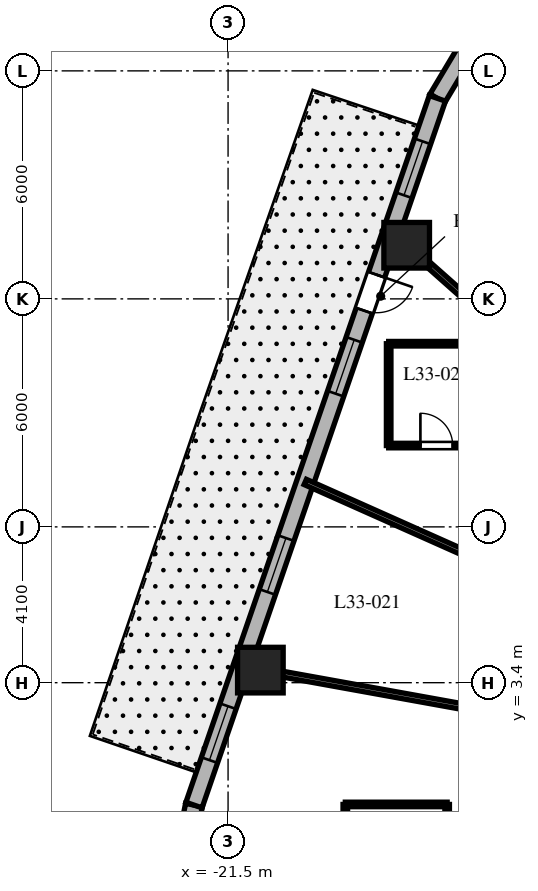
"""IFC4 building model, lengths in metres.
Left out: names, types, materials, properties, quantities, classifications, styles, units other than length and angle.
Written with IfcOpenShell. Run it as: python <this file> out.ifc"""

import sys

from ifc_helpers import new_model, si_unit, direction, frame, frame_2d, origin, origin_2d, place, context, subcontext, project, spatial, rectangle, extrude, element, fill, save


model = new_model("IFC4")
c1 = context("Model", 3, precision=1e-05, world=origin(), true_north=direction((0.0, 1.0)))
c2 = subcontext(c1, "Body", "Model", "MODEL_VIEW")
j1 = project(units=[si_unit("LENGTHUNIT", "METRE"), si_unit("PLANEANGLEUNIT", "RADIAN")], contexts=[c1])
p1 = place(None, origin())
s1 = spatial("IfcSite", under=j1, at=p1, CompositionType="ELEMENT")
p2 = place(p1, origin())
s2 = spatial("IfcBuilding", under=s1, at=p2, CompositionType="ELEMENT")
p3 = place(p2, frame((0.0, 0.0, 135.8)))
s3 = spatial("IfcBuildingStorey", under=s2, at=p3, CompositionType="ELEMENT", Elevation=135.8)
for number, where, z_axis, x_axis in (
    (1, (-16.8, 14.911, 0.0), (0.0, 0.0, 1.0), (1.0, 0.0, 0.0)),
    (2, (-20.65, 3.731, 0.0), (0.0, 0.0, 1.0), (1.0, 0.0, 0.0)),
):
    element("IfcColumn", number, at=place(p3, frame(where, z_axis=z_axis, x_axis=x_axis)), inside=s3, PredefinedType="COLUMN", context=c2, shape_type="SweptSolid", body=[
        extrude(rectangle(XDim=1.2, YDim=1.2, at=origin_2d()), origin(), (0.0, 0.0, 1.0), 3.7),
    ])
p4 = place(p3, frame((-15.272, 19.984, 0.0), z_axis=(0.0, 0.0, 1.0), x_axis=(-0.512579347361, -0.858639862025, 0.0)))
e3 = element("IfcWall", 3, at=p4, inside=s3, PredefinedType="SOLIDWALL", context=c2, shape_type="SweptSolid", body=[
    extrude(rectangle(XDim=1.406, YDim=0.45, at=frame_2d((0.703, 0.0))), origin(), (0.0, 0.0, 1.0), 3.38),
])
p5 = place(p3, frame((-22.397, 0.179, 0.0), z_axis=(0.0, 0.0, 1.0), x_axis=(-0.199313589404, -0.979935759669, 0.0)))
e4 = element("IfcWall", 4, at=p5, inside=s3, PredefinedType="SOLIDWALL", context=c2, shape_type="SweptSolid", body=[
    extrude(rectangle(XDim=0.896, YDim=0.45, at=frame_2d((0.448, 0.0))), origin(), (0.0, 0.0, 1.0), 3.38),
])
p6 = place(p3, frame((-15.992, 18.777, 0.0), z_axis=(0.0, 0.0, 1.0), x_axis=(-0.325606988926, -0.945505202927, 0.0)))
e5 = element("IfcWall", 5, at=p6, inside=s3, PredefinedType="SOLIDWALL", context=c2, shape_type="SweptSolid", body=[
    extrude(rectangle(XDim=19.669, YDim=0.45, at=frame_2d((9.835, 0.0))), origin(), (0.0, 0.0, 1.0), 3.38),
])
p7 = place(p6, frame((4.909, 0.0, 0.0)))
e6 = element("IfcOpeningElement", 6, at=p7, cuts=e5, PredefinedType="OPENING", context=c2, shape_type="SweptSolid", body=[
    extrude(rectangle(XDim=1.0, YDim=2.15, at=frame_2d((0.5, 1.075))), frame((0.0, 0.235, 0.0), z_axis=(0.0, -1.0, 0.0), x_axis=(1.0, 0.0, 0.0)), (0.0, 0.0, 1.0), 0.47),
])
p8 = place(p6, frame((1.197, 0.0, 0.8)))
e7 = element("IfcOpeningElement", 7, at=p8, cuts=e5, PredefinedType="OPENING", context=c2, shape_type="SweptSolid", body=[
    extrude(rectangle(XDim=1.5, YDim=1.8, at=frame_2d((0.75, 0.9))), frame((0.0, 0.235, 0.0), z_axis=(0.0, -1.0, 0.0), x_axis=(1.0, 0.0, 0.0)), (0.0, 0.0, 1.0), 0.47),
])
p9 = place(p6, frame((6.72, 0.0, 0.8)))
e8 = element("IfcOpeningElement", 8, at=p9, cuts=e5, PredefinedType="OPENING", context=c2, shape_type="SweptSolid", body=[
    extrude(rectangle(XDim=1.5, YDim=1.8, at=frame_2d((0.75, 0.9))), frame((0.0, 0.235, 0.0), z_axis=(0.0, -1.0, 0.0), x_axis=(1.0, 0.0, 0.0)), (0.0, 0.0, 1.0), 0.47),
])
p10 = place(p6, frame((12.238, 0.0, 0.8)))
e9 = element("IfcOpeningElement", 9, at=p10, cuts=e5, PredefinedType="OPENING", context=c2, shape_type="SweptSolid", body=[
    extrude(rectangle(XDim=1.5, YDim=1.8, at=frame_2d((0.75, 0.9))), frame((0.0, 0.235, 0.0), z_axis=(0.0, -1.0, 0.0), x_axis=(1.0, 0.0, 0.0)), (0.0, 0.0, 1.0), 0.47),
])
p11 = place(p6, frame((16.918, 0.0, 0.8)))
e10 = element("IfcOpeningElement", 10, at=p11, cuts=e5, PredefinedType="OPENING", context=c2, shape_type="SweptSolid", body=[
    extrude(rectangle(XDim=1.5, YDim=1.8, at=frame_2d((0.75, 0.9))), frame((0.0, 0.235, 0.0), z_axis=(0.0, -1.0, 0.0), x_axis=(1.0, 0.0, 0.0)), (0.0, 0.0, 1.0), 0.47),
])
p12 = place(p3, frame((-11.098, 9.85, 0.0), z_axis=(0.0, 0.0, 1.0), x_axis=(-0.747904295103, 0.663806572253, 0.0)))
e11 = element("IfcWall", 11, at=p12, inside=s3, PredefinedType="PARTITIONING", context=c2, shape_type="SweptSolid", body=[
    extrude(rectangle(XDim=8.16, YDim=0.15, at=frame_2d((4.08, 0.0))), origin(), (0.0, 0.0, 1.0), 2.52),
])
p13 = place(p3, frame((-11.35, 5.062, 0.0), z_axis=(0.0, 0.0, 1.0), x_axis=(-0.91329663997, 0.407295037312, 0.0)))
e12 = element("IfcWall", 12, at=p13, inside=s3, PredefinedType="PARTITIONING", context=c2, shape_type="SweptSolid", body=[
    extrude(rectangle(XDim=8.889, YDim=0.15, at=frame_2d((4.445, 0.0))), origin(), (0.0, 0.0, 1.0), 2.52),
])
p14 = place(p3, frame((-11.35, 2.051, 0.0), z_axis=(0.0, 0.0, 1.0), x_axis=(-0.984068313063, 0.177790762484, 0.0)))
e13 = element("IfcWall", 13, at=p14, inside=s3, PredefinedType="PARTITIONING", context=c2, shape_type="SweptSolid", body=[
    extrude(rectangle(XDim=9.951, YDim=0.15, at=frame_2d((4.976, 0.0))), origin(), (0.0, 0.0, 1.0), 2.52),
])
p15 = place(p3, frame((-17.274, 9.64, 0.0), z_axis=(0.0, 0.0, 1.0), x_axis=(1.0, 0.0, 0.0)))
e14 = element("IfcWall", 14, at=p15, inside=s3, PredefinedType="PARTITIONING", context=c2, shape_type="SweptSolid", body=[
    extrude(rectangle(XDim=2.52, YDim=0.12, at=frame_2d((1.26, 0.0))), origin(), (0.0, 0.0, 1.0), 2.952),
])
p16 = place(p15, frame((0.835, 0.0, 0.0)))
e15 = element("IfcOpeningElement", 15, at=p16, cuts=e14, PredefinedType="OPENING", context=c2, shape_type="SweptSolid", body=[
    extrude(rectangle(XDim=0.85, YDim=2.03, at=frame_2d((0.425, 1.015))), frame((0.0, 0.07, 0.0), z_axis=(0.0, -1.0, 0.0), x_axis=(1.0, 0.0, 0.0)), (0.0, 0.0, 1.0), 0.14),
])
p17 = place(p3, frame((-14.754, 12.32, 0.0), z_axis=(0.0, 0.0, 1.0), x_axis=(-1.0, 0.0, 0.0)))
e16 = element("IfcWall", 16, at=p17, inside=s3, PredefinedType="PARTITIONING", context=c2, shape_type="SweptSolid", body=[
    extrude(rectangle(XDim=2.52, YDim=0.12, at=frame_2d((1.26, 0.0))), origin(), (0.0, 0.0, 1.0), 3.38),
])
p18 = place(p3, frame((-17.274, 12.32, 0.0), z_axis=(0.0, 0.0, 1.0), x_axis=(0.0, -1.0, 0.0)))
e17 = element("IfcWall", 17, at=p18, inside=s3, PredefinedType="PARTITIONING", context=c2, shape_type="SweptSolid", body=[
    extrude(rectangle(XDim=2.68, YDim=0.12, at=frame_2d((1.34, 0.0))), origin(), (0.0, 0.0, 1.0), 3.38),
])
p19 = place(p3, frame((-15.735, -2.344, 0.0), z_axis=(0.0, 0.0, 1.0), x_axis=(0.0, 1.0, 0.0)))
e18 = element("IfcWall", 18, at=p19, inside=s3, PredefinedType="PARTITIONING", context=c2, shape_type="SweptSolid", body=[
    extrude(rectangle(XDim=2.54, YDim=0.12, at=frame_2d((1.27, 0.0))), origin(), (0.0, 0.0, 1.0), 3.38),
])
p20 = place(p3, frame((-15.735, 0.196, 0.0), z_axis=(0.0, 0.0, 1.0), x_axis=(-1.0, 0.0, 0.0)))
e19 = element("IfcWall", 19, at=p20, inside=s3, PredefinedType="PARTITIONING", context=c2, shape_type="SweptSolid", body=[
    extrude(rectangle(XDim=2.68, YDim=0.12, at=frame_2d((1.34, 0.0))), origin(), (0.0, 0.0, 1.0), 2.821),
])
p21 = place(p3, frame((-18.415, 0.196, 0.0), z_axis=(0.0, 0.0, 1.0), x_axis=(0.0, -1.0, 0.0)))
e20 = element("IfcWall", 20, at=p21, inside=s3, PredefinedType="PARTITIONING", context=c2, shape_type="SweptSolid", body=[
    extrude(rectangle(XDim=2.54, YDim=0.12, at=frame_2d((1.27, 0.0))), origin(), (0.0, 0.0, 1.0), 3.38),
])
p22 = place(p7, origin())
e21 = element("IfcDoor", 21, at=p22, inside=s3, OperationType="SINGLE_SWING_LEFT", PredefinedType="DOOR", context=c2, shape_type="SweptSolid", body=[
    extrude(rectangle(XDim=1.0, YDim=2.15, at=frame_2d((0.5, 1.075))), frame((0.0, 0.025, 0.0), z_axis=(0.0, -1.0, 0.0), x_axis=(1.0, 0.0, 0.0)), (0.0, 0.0, 1.0), 0.05),
])
fill(e6, e21)
p23 = place(p8, origin())
e22 = element("IfcWindow", 22, at=p23, inside=s3, PartitioningType="SINGLE_PANEL", PredefinedType="WINDOW", context=c2, shape_type="SweptSolid", body=[
    extrude(rectangle(XDim=1.5, YDim=1.8, at=frame_2d((0.75, 0.9))), frame((0.0, 0.03, 0.0), z_axis=(0.0, -1.0, 0.0), x_axis=(1.0, 0.0, 0.0)), (0.0, 0.0, 1.0), 0.06),
])
fill(e7, e22)
p24 = place(p9, origin())
e23 = element("IfcWindow", 23, at=p24, inside=s3, PartitioningType="SINGLE_PANEL", PredefinedType="WINDOW", context=c2, shape_type="SweptSolid", body=[
    extrude(rectangle(XDim=1.5, YDim=1.8, at=frame_2d((0.75, 0.9))), frame((0.0, 0.03, 0.0), z_axis=(0.0, -1.0, 0.0), x_axis=(1.0, 0.0, 0.0)), (0.0, 0.0, 1.0), 0.06),
])
fill(e8, e23)
p25 = place(p10, origin())
e24 = element("IfcWindow", 24, at=p25, inside=s3, PartitioningType="SINGLE_PANEL", PredefinedType="WINDOW", context=c2, shape_type="SweptSolid", body=[
    extrude(rectangle(XDim=1.5, YDim=1.8, at=frame_2d((0.75, 0.9))), frame((0.0, 0.03, 0.0), z_axis=(0.0, -1.0, 0.0), x_axis=(1.0, 0.0, 0.0)), (0.0, 0.0, 1.0), 0.06),
])
fill(e9, e24)
p26 = place(p11, origin())
e25 = element("IfcWindow", 25, at=p26, inside=s3, PartitioningType="SINGLE_PANEL", PredefinedType="WINDOW", context=c2, shape_type="SweptSolid", body=[
    extrude(rectangle(XDim=1.5, YDim=1.8, at=frame_2d((0.75, 0.9))), frame((0.0, 0.03, 0.0), z_axis=(0.0, -1.0, 0.0), x_axis=(1.0, 0.0, 0.0)), (0.0, 0.0, 1.0), 0.06),
])
fill(e10, e25)
p27 = place(p16, origin())
e26 = element("IfcDoor", 26, at=p27, inside=s3, OperationType="SINGLE_SWING_LEFT", PredefinedType="DOOR", context=c2, shape_type="SweptSolid", body=[
    extrude(rectangle(XDim=0.85, YDim=2.03, at=frame_2d((0.425, 1.015))), frame((0.0, 0.025, 0.0), z_axis=(0.0, -1.0, 0.0), x_axis=(1.0, 0.0, 0.0)), (0.0, 0.0, 1.0), 0.05),
])
fill(e15, e26)
save(model, sys.argv[1])
